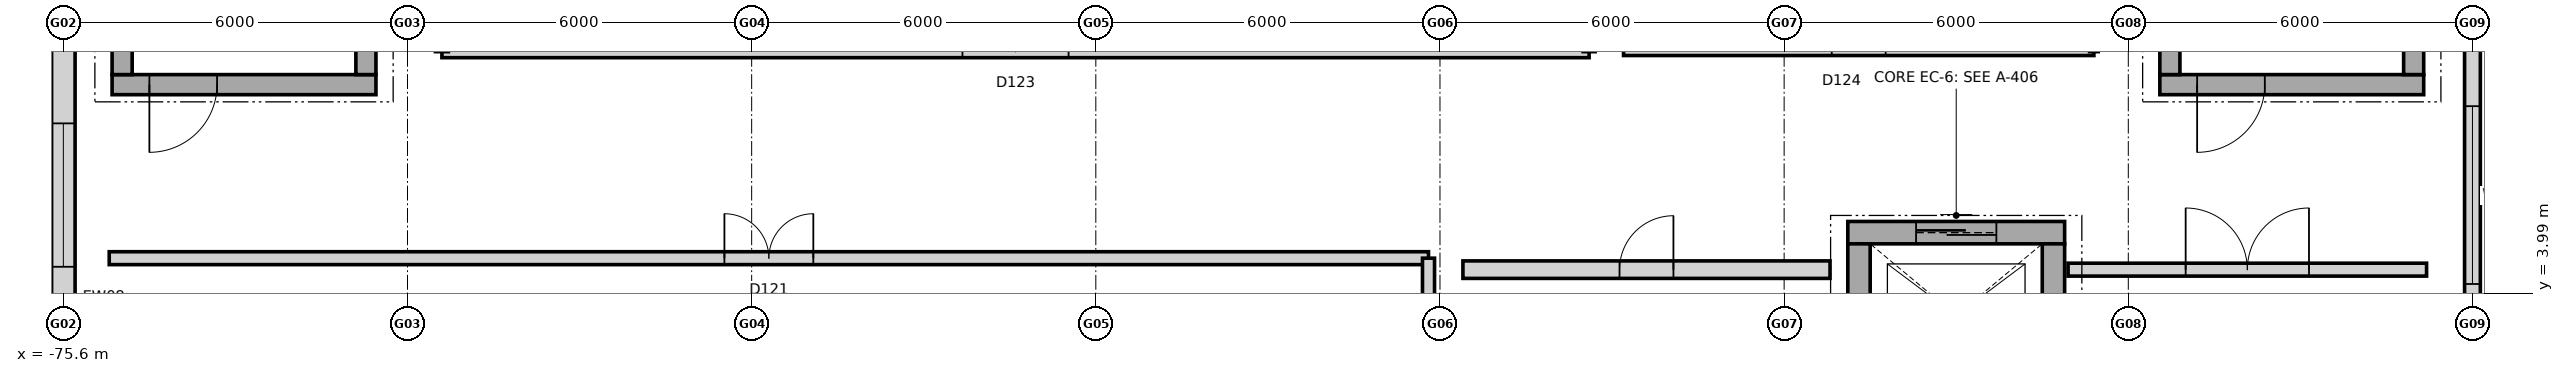
"""IFC4 building model, lengths in metres.
Left out: names, types, materials, properties, quantities, classifications, styles, units other than length and angle.
Written with IfcOpenShell. Run it as: python <this file> out.ifc"""

import sys

from ifc_helpers import new_model, si_unit, direction, frame, frame_2d, origin, place, context, subcontext, project, spatial, rectangle, extrude, element, fill, save


model = new_model("IFC4")
c1 = context("Model", 3, precision=1e-05, world=origin(), true_north=direction((0.0, 1.0)))
c2 = subcontext(c1, "Body", "Model", "MODEL_VIEW")
j1 = project(units=[si_unit("LENGTHUNIT", "METRE"), si_unit("PLANEANGLEUNIT", "RADIAN")], contexts=[c1])
p1 = place(None, origin())
s1 = spatial("IfcSite", under=j1, at=p1, CompositionType="ELEMENT")
p2 = place(p1, origin())
s2 = spatial("IfcBuilding", under=s1, at=p2, CompositionType="ELEMENT")
p3 = place(p2, frame((0.0, 0.0, 15.0)))
s3 = spatial("IfcBuildingStorey", under=s2, at=p3, CompositionType="ELEMENT", Elevation=15.0)
p4 = place(p3, frame((-75.6, 1.648, 0.0), z_axis=(0.0, 0.0, 1.0), x_axis=(0.0, 1.0, 0.0)))
e1 = element("IfcWall", 1, at=p4, inside=s3, PredefinedType="STANDARD", context=c2, shape_type="SweptSolid", body=[
    extrude(rectangle(XDim=8.104, YDim=0.41, at=frame_2d((4.052, 0.0))), origin(), (0.0, 0.0, 1.0), 3.829),
])
p5 = place(p4, frame((2.802, 0.0, 0.85)))
e2 = element("IfcOpeningElement", 2, at=p5, cuts=e1, PredefinedType="OPENING", context=c2, shape_type="SweptSolid", body=[
    extrude(rectangle(XDim=2.5, YDim=2.1, at=frame_2d((1.25, 1.05))), frame((0.0, 0.215, 0.0), z_axis=(0.0, -1.0, 0.0), x_axis=(1.0, 0.0, 0.0)), (0.0, 0.0, 1.0), 0.43),
])
p6 = place(p3, frame((-33.6, 9.752, 0.0), z_axis=(0.0, 0.0, 1.0), x_axis=(0.0, -1.0, 0.0)))
e3 = element("IfcWall", 3, at=p6, inside=s3, PredefinedType="STANDARD", context=c2, shape_type="SweptSolid", body=[
    extrude(rectangle(XDim=8.104, YDim=0.275, at=frame_2d((4.052, 0.0))), origin(), (0.0, 0.0, 1.0), 3.829),
])
p7 = place(p6, frame((2.502, 0.0, 0.85)))
e4 = element("IfcOpeningElement", 4, at=p7, cuts=e3, PredefinedType="OPENING", context=c2, shape_type="SweptSolid", body=[
    extrude(rectangle(XDim=3.1, YDim=2.1, at=frame_2d((1.55, 1.05))), frame((0.0, 0.147, 0.0), z_axis=(0.0, -1.0, 0.0), x_axis=(1.0, 0.0, 0.0)), (0.0, 0.0, 1.0), 0.295),
])
p8 = place(p3, frame((-70.15, 7.625, 0.0), z_axis=(0.0, 0.0, 1.0), x_axis=(-1.0, 0.0, 0.0)))
e5 = element("IfcWall", 5, at=p8, inside=s3, PredefinedType="SHEAR", context=c2, shape_type="SweptSolid", body=[
    extrude(rectangle(XDim=4.6, YDim=0.35, at=frame_2d((2.3, 0.0))), origin(), (0.0, 0.0, 1.0), 4.8),
])
p9 = place(p8, frame((2.77, 0.0, 0.0)))
e6 = element("IfcOpeningElement", 6, at=p9, cuts=e5, PredefinedType="OPENING", context=c2, shape_type="SweptSolid", body=[
    extrude(rectangle(XDim=1.18, YDim=2.15, at=frame_2d((0.59, 1.075))), frame((0.0, 0.185, 0.0), z_axis=(0.0, -1.0, 0.0), x_axis=(1.0, 0.0, 0.0)), (0.0, 0.0, 1.0), 0.37),
])
for number, where, z_axis, x_axis in (
    (7, (-74.575, 7.8, 0.0), (0.0, 0.0, 1.0), (0.0, 1.0, 0.0)),
    (8, (-70.325, 16.1, 0.0), (0.0, 0.0, 1.0), (0.0, -1.0, 0.0)),
):
    element("IfcWall", number, at=place(p3, frame(where, z_axis=z_axis, x_axis=x_axis)), inside=s3, PredefinedType="SHEAR", context=c2, shape_type="SweptSolid", body=[
        extrude(rectangle(XDim=8.3, YDim=0.35, at=frame_2d((4.15, 0.0))), origin(), (0.0, 0.0, 1.0), 4.8),
    ])
p10 = place(p3, frame((-34.45, 7.625, 0.0), z_axis=(0.0, 0.0, 1.0), x_axis=(-1.0, 0.0, 0.0)))
e9 = element("IfcWall", 9, at=p10, inside=s3, PredefinedType="SHEAR", context=c2, shape_type="SweptSolid", body=[
    extrude(rectangle(XDim=4.6, YDim=0.35, at=frame_2d((2.3, 0.0))), origin(), (0.0, 0.0, 1.0), 4.8),
])
p11 = place(p10, frame((2.77, 0.0, 0.0)))
e10 = element("IfcOpeningElement", 10, at=p11, cuts=e9, PredefinedType="OPENING", context=c2, shape_type="SweptSolid", body=[
    extrude(rectangle(XDim=1.18, YDim=2.15, at=frame_2d((0.59, 1.075))), frame((0.0, 0.185, 0.0), z_axis=(0.0, -1.0, 0.0), x_axis=(1.0, 0.0, 0.0)), (0.0, 0.0, 1.0), 0.37),
])
for number, where, z_axis, x_axis in (
    (11, (-38.875, 7.8, 0.0), (0.0, 0.0, 1.0), (0.0, 1.0, 0.0)),
    (12, (-34.625, 16.1, 0.0), (0.0, 0.0, 1.0), (0.0, -1.0, 0.0)),
):
    element("IfcWall", number, at=place(p3, frame(where, z_axis=z_axis, x_axis=x_axis)), inside=s3, PredefinedType="SHEAR", context=c2, shape_type="SweptSolid", body=[
        extrude(rectangle(XDim=8.3, YDim=0.35, at=frame_2d((4.15, 0.0))), origin(), (0.0, 0.0, 1.0), 4.8),
    ])
p12 = place(p3, frame((-44.49, 5.045, 0.0), z_axis=(0.0, 0.0, 1.0), x_axis=(1.0, 0.0, 0.0)))
e13 = element("IfcWall", 13, at=p12, inside=s3, PredefinedType="SHEAR", context=c2, shape_type="SweptSolid", body=[
    extrude(rectangle(XDim=3.78, YDim=0.39, at=frame_2d((1.89, 0.0))), origin(), (0.0, 0.0, 1.0), 4.8),
])
p13 = place(p12, frame((1.19, 0.0, 0.0)))
e14 = element("IfcOpeningElement", 14, at=p13, cuts=e13, PredefinedType="OPENING", context=c2, shape_type="SweptSolid", body=[
    extrude(rectangle(XDim=1.4, YDim=2.2, at=frame_2d((0.7, 1.1))), frame((0.0, 0.205, 0.0), z_axis=(0.0, -1.0, 0.0), x_axis=(1.0, 0.0, 0.0)), (0.0, 0.0, 1.0), 0.41),
])
for number, where, z_axis, x_axis in (
    (15, (-44.295, 2.35, 0.0), (0.0, 0.0, 1.0), (0.0, 1.0, 0.0)),
    (16, (-40.905, 4.85, 0.0), (0.0, 0.0, 1.0), (0.0, -1.0, 0.0)),
):
    element("IfcWall", number, at=place(p3, frame(where, z_axis=z_axis, x_axis=x_axis)), inside=s3, PredefinedType="SHEAR", context=c2, shape_type="SweptSolid", body=[
        extrude(rectangle(XDim=2.5, YDim=0.39, at=frame_2d((1.25, 0.0))), origin(), (0.0, 0.0, 1.0), 4.8),
    ])
p14 = place(p3, frame((-74.8, 4.6, 0.0), z_axis=(0.0, 0.0, 1.0), x_axis=(1.0, 0.0, 0.0)))
e17 = element("IfcWall", 17, at=p14, inside=s3, PredefinedType="PARTITIONING", context=c2, shape_type="SweptSolid", body=[
    extrude(rectangle(XDim=23.0, YDim=0.225, at=frame_2d((11.5, 0.0))), origin(), (0.0, 0.0, 1.0), 4.42),
])
p15 = place(p14, frame((10.725, 0.0, 0.0)))
e18 = element("IfcOpeningElement", 18, at=p15, cuts=e17, PredefinedType="OPENING", context=c2, shape_type="SweptSolid", body=[
    extrude(rectangle(XDim=1.55, YDim=2.2, at=frame_2d((0.775, 1.1))), frame((0.0, 0.123, 0.0), z_axis=(0.0, -1.0, 0.0), x_axis=(1.0, 0.0, 0.0)), (0.0, 0.0, 1.0), 0.245),
])
p16 = place(p3, frame((-51.8, -16.0, 0.0), z_axis=(0.0, 0.0, 1.0), x_axis=(0.0, 1.0, 0.0)))
e19 = element("IfcWall", 19, at=p16, inside=s3, PredefinedType="PARTITIONING", context=c2, shape_type="SweptSolid", body=[
    extrude(rectangle(XDim=20.6, YDim=0.21, at=frame_2d((10.3, 0.0))), origin(), (0.0, 0.0, 1.0), 3.69),
])
p17 = place(p3, frame((-51.2, 4.4, 0.0), z_axis=(0.0, 0.0, 1.0), x_axis=(1.0, 0.0, 0.0)))
e20 = element("IfcWall", 20, at=p17, inside=s3, PredefinedType="PARTITIONING", context=c2, shape_type="SweptSolid", body=[
    extrude(rectangle(XDim=6.4, YDim=0.305, at=frame_2d((3.2, 0.0))), origin(), (0.0, 0.0, 1.0), 4.42),
])
p18 = place(p17, frame((2.73, 0.0, 0.0)))
e21 = element("IfcOpeningElement", 21, at=p18, cuts=e20, PredefinedType="OPENING", context=c2, shape_type="SweptSolid", body=[
    extrude(rectangle(XDim=0.94, YDim=2.1, at=frame_2d((0.47, 1.05))), frame((0.0, 0.162, 0.0), z_axis=(0.0, -1.0, 0.0), x_axis=(1.0, 0.0, 0.0)), (0.0, 0.0, 1.0), 0.325),
])
p19 = place(p3, frame((-69.0, 8.2, 0.0), z_axis=(0.0, 0.0, 1.0), x_axis=(1.0, 0.0, 0.0)))
e22 = element("IfcWall", 22, at=p19, inside=s3, PredefinedType="PARTITIONING", context=c2, shape_type="SweptSolid", body=[
    extrude(rectangle(XDim=20.0, YDim=0.21, at=frame_2d((10.0, 0.0))), origin(), (0.0, 0.0, 1.0), 4.42),
])
p20 = place(p19, frame((9.075, 0.0, 0.0)))
e23 = element("IfcOpeningElement", 23, at=p20, cuts=e22, PredefinedType="OPENING", context=c2, shape_type="SweptSolid", body=[
    extrude(rectangle(XDim=1.85, YDim=2.3, at=frame_2d((0.925, 1.15))), frame((0.0, 0.115, 0.0), z_axis=(0.0, -1.0, 0.0), x_axis=(1.0, 0.0, 0.0)), (0.0, 0.0, 1.0), 0.23),
])
p21 = place(p3, frame((-48.4, 8.2, 0.0), z_axis=(0.0, 0.0, 1.0), x_axis=(1.0, 0.0, 0.0)))
e24 = element("IfcWall", 24, at=p21, inside=s3, PredefinedType="PARTITIONING", context=c2, shape_type="SweptSolid", body=[
    extrude(rectangle(XDim=8.2, YDim=0.135, at=frame_2d((4.1, 0.0))), origin(), (0.0, 0.0, 1.0), 4.42),
])
p22 = place(p21, frame((3.63, 0.0, 0.0)))
e25 = element("IfcOpeningElement", 25, at=p22, cuts=e24, PredefinedType="OPENING", context=c2, shape_type="SweptSolid", body=[
    extrude(rectangle(XDim=0.94, YDim=2.1, at=frame_2d((0.47, 1.05))), frame((0.0, 0.077, 0.0), z_axis=(0.0, -1.0, 0.0), x_axis=(1.0, 0.0, 0.0)), (0.0, 0.0, 1.0), 0.155),
])
p23 = place(p3, frame((-40.65, 4.4, 0.0), z_axis=(0.0, 0.0, 1.0), x_axis=(1.0, 0.0, 0.0)))
e26 = element("IfcWall", 26, at=p23, inside=s3, PredefinedType="PARTITIONING", context=c2, shape_type="SweptSolid", body=[
    extrude(rectangle(XDim=6.25, YDim=0.225, at=frame_2d((3.125, 0.0))), origin(), (0.0, 0.0, 1.0), 4.42),
])
p24 = place(p23, frame((2.05, 0.0, 0.0)))
e27 = element("IfcOpeningElement", 27, at=p24, cuts=e26, PredefinedType="OPENING", context=c2, shape_type="SweptSolid", body=[
    extrude(rectangle(XDim=2.15, YDim=2.4, at=frame_2d((1.075, 1.2))), frame((0.0, 0.123, 0.0), z_axis=(0.0, -1.0, 0.0), x_axis=(1.0, 0.0, 0.0)), (0.0, 0.0, 1.0), 0.245),
])
p25 = place(p5, origin())
e28 = element("IfcWindow", 28, at=p25, inside=s3, PartitioningType="SINGLE_PANEL", PredefinedType="WINDOW", context=c2, shape_type="SweptSolid", body=[
    extrude(rectangle(XDim=2.5, YDim=2.1, at=frame_2d((1.25, 1.05))), frame((0.0, 0.03, 0.0), z_axis=(0.0, -1.0, 0.0), x_axis=(1.0, 0.0, 0.0)), (0.0, 0.0, 1.0), 0.06),
])
fill(e2, e28)
p26 = place(p7, origin())
e29 = element("IfcWindow", 29, at=p26, inside=s3, PartitioningType="SINGLE_PANEL", PredefinedType="WINDOW", context=c2, shape_type="SweptSolid", body=[
    extrude(rectangle(XDim=3.1, YDim=2.1, at=frame_2d((1.55, 1.05))), frame((0.0, 0.03, 0.0), z_axis=(0.0, -1.0, 0.0), x_axis=(1.0, 0.0, 0.0)), (0.0, 0.0, 1.0), 0.06),
])
fill(e4, e29)
p27 = place(p9, origin())
e30 = element("IfcDoor", 30, at=p27, inside=s3, OperationType="SINGLE_SWING_RIGHT", PredefinedType="DOOR", context=c2, shape_type="SweptSolid", body=[
    extrude(rectangle(XDim=1.18, YDim=2.15, at=frame_2d((0.59, 1.075))), frame((0.0, 0.025, 0.0), z_axis=(0.0, -1.0, 0.0), x_axis=(1.0, 0.0, 0.0)), (0.0, 0.0, 1.0), 0.05),
])
fill(e6, e30)
p28 = place(p11, origin())
e31 = element("IfcDoor", 31, at=p28, inside=s3, OperationType="SINGLE_SWING_RIGHT", PredefinedType="DOOR", context=c2, shape_type="SweptSolid", body=[
    extrude(rectangle(XDim=1.18, YDim=2.15, at=frame_2d((0.59, 1.075))), frame((0.0, 0.025, 0.0), z_axis=(0.0, -1.0, 0.0), x_axis=(1.0, 0.0, 0.0)), (0.0, 0.0, 1.0), 0.05),
])
fill(e10, e31)
p29 = place(p13, origin())
e32 = element("IfcDoor", 32, at=p29, inside=s3, OperationType="SLIDING_TO_LEFT", PredefinedType="DOOR", context=c2, shape_type="SweptSolid", body=[
    extrude(rectangle(XDim=1.4, YDim=2.2, at=frame_2d((0.7, 1.1))), frame((0.0, 0.025, 0.0), z_axis=(0.0, -1.0, 0.0), x_axis=(1.0, 0.0, 0.0)), (0.0, 0.0, 1.0), 0.05),
])
fill(e14, e32)
p30 = place(p15, origin())
e33 = element("IfcDoor", 33, at=p30, inside=s3, OperationType="DOUBLE_DOOR_SINGLE_SWING", PredefinedType="DOOR", context=c2, shape_type="SweptSolid", body=[
    extrude(rectangle(XDim=1.55, YDim=2.2, at=frame_2d((0.775, 1.1))), frame((0.0, 0.025, 0.0), z_axis=(0.0, -1.0, 0.0), x_axis=(1.0, 0.0, 0.0)), (0.0, 0.0, 1.0), 0.05),
])
fill(e18, e33)
p31 = place(p18, origin())
e34 = element("IfcDoor", 34, at=p31, inside=s3, OperationType="SINGLE_SWING_RIGHT", PredefinedType="DOOR", context=c2, shape_type="SweptSolid", body=[
    extrude(rectangle(XDim=0.94, YDim=2.1, at=frame_2d((0.47, 1.05))), frame((0.0, 0.025, 0.0), z_axis=(0.0, -1.0, 0.0), x_axis=(1.0, 0.0, 0.0)), (0.0, 0.0, 1.0), 0.05),
])
fill(e21, e34)
p32 = place(p20, origin())
e35 = element("IfcDoor", 35, at=p32, inside=s3, OperationType="DOUBLE_DOOR_SINGLE_SWING", PredefinedType="DOOR", context=c2, shape_type="SweptSolid", body=[
    extrude(rectangle(XDim=1.85, YDim=2.3, at=frame_2d((0.925, 1.15))), frame((0.0, 0.025, 0.0), z_axis=(0.0, -1.0, 0.0), x_axis=(1.0, 0.0, 0.0)), (0.0, 0.0, 1.0), 0.05),
])
fill(e23, e35)
p33 = place(p22, origin())
e36 = element("IfcDoor", 36, at=p33, inside=s3, OperationType="SINGLE_SWING_LEFT", PredefinedType="DOOR", context=c2, shape_type="SweptSolid", body=[
    extrude(rectangle(XDim=0.94, YDim=2.1, at=frame_2d((0.47, 1.05))), frame((0.0, 0.025, 0.0), z_axis=(0.0, -1.0, 0.0), x_axis=(1.0, 0.0, 0.0)), (0.0, 0.0, 1.0), 0.05),
])
fill(e25, e36)
p34 = place(p24, origin())
e37 = element("IfcDoor", 37, at=p34, inside=s3, OperationType="DOUBLE_DOOR_SINGLE_SWING", PredefinedType="DOOR", context=c2, shape_type="SweptSolid", body=[
    extrude(rectangle(XDim=2.15, YDim=2.4, at=frame_2d((1.075, 1.2))), frame((0.0, 0.025, 0.0), z_axis=(0.0, -1.0, 0.0), x_axis=(1.0, 0.0, 0.0)), (0.0, 0.0, 1.0), 0.05),
])
fill(e27, e37)
save(model, sys.argv[1])
